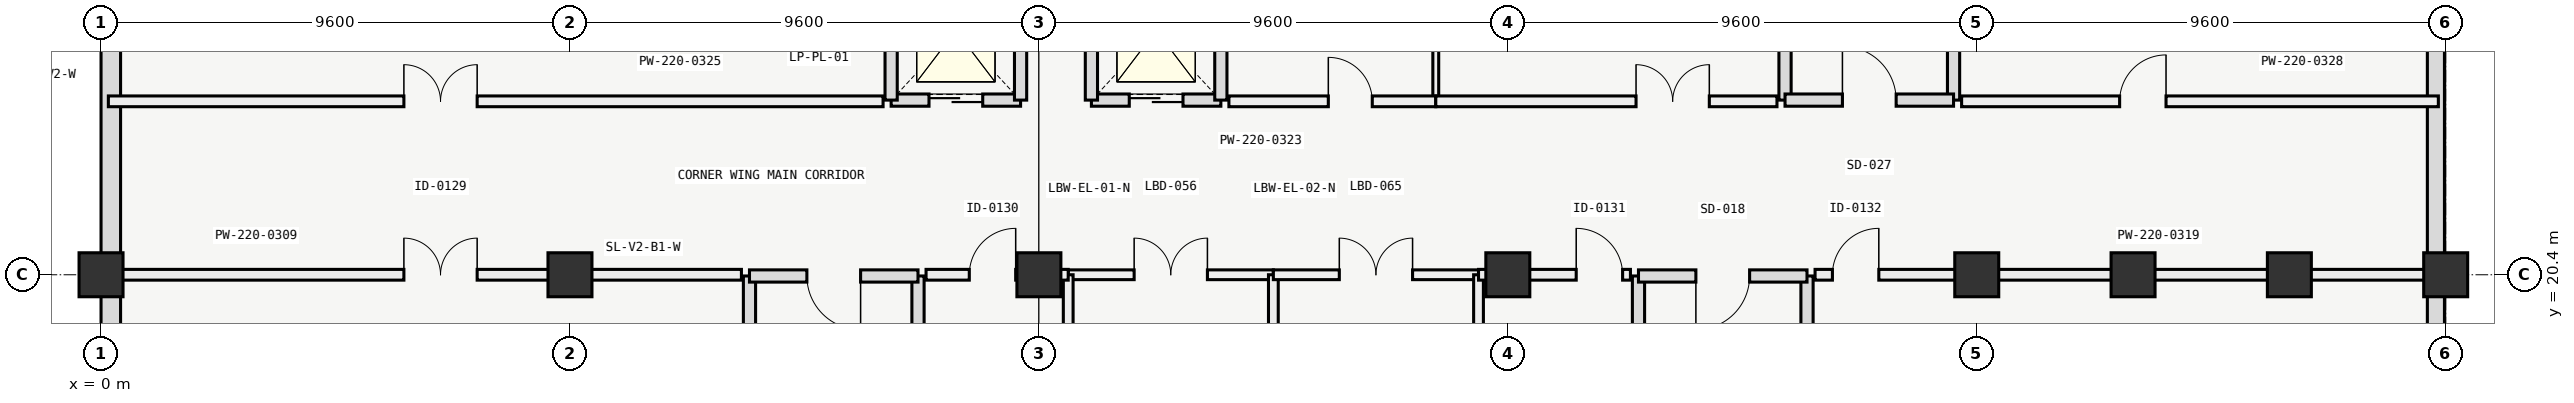
"""IFC4 building model, lengths in metres.
Left out: names, types, materials, properties, quantities, classifications, styles, units other than length and angle.
Written with IfcOpenShell. Run it as: python <this file> out.ifc"""

import sys

from ifc_helpers import new_model, si_unit, direction, frame, frame_2d, origin, origin_2d, place, context, subcontext, project, spatial, rectangle, extrude, element, fill, save


model = new_model("IFC4")
c1 = context("Model", 3, precision=1e-05, world=origin(), true_north=direction((0.0, 1.0)))
c2 = subcontext(c1, "Body", "Model", "MODEL_VIEW")
j1 = project(units=[si_unit("LENGTHUNIT", "METRE"), si_unit("PLANEANGLEUNIT", "RADIAN")], contexts=[c1])
p1 = place(None, origin())
s1 = spatial("IfcSite", under=j1, at=p1, CompositionType="ELEMENT")
p2 = place(p1, origin())
s2 = spatial("IfcBuilding", under=s1, at=p2, CompositionType="ELEMENT")
p3 = place(p2, frame((0.0, 0.0, -4.2)))
s3 = spatial("IfcBuildingStorey", under=s2, at=p3, CompositionType="ELEMENT", Elevation=-4.2)
for number, where, z_axis, x_axis in (
    (1, (0.0, 20.4, 0.0), (0.0, 0.0, 1.0), (1.0, 0.0, 0.0)),
    (2, (9.6, 20.4, 0.0), (0.0, 0.0, 1.0), (1.0, 0.0, 0.0)),
    (3, (19.2, 20.4, 0.0), (0.0, 0.0, 1.0), (1.0, 0.0, 0.0)),
    (4, (28.8, 20.4, 0.0), (0.0, 0.0, 1.0), (1.0, 0.0, 0.0)),
    (5, (38.4, 20.4, 0.0), (0.0, 0.0, 1.0), (1.0, 0.0, 0.0)),
    (6, (41.6, 20.4, 0.0), (0.0, 0.0, 1.0), (1.0, 0.0, 0.0)),
    (7, (44.8, 20.4, 0.0), (0.0, 0.0, 1.0), (1.0, 0.0, 0.0)),
    (8, (48.0, 20.4, 0.0), (0.0, 0.0, 1.0), (1.0, 0.0, 0.0)),
):
    element("IfcColumn", number, at=place(p3, frame(where, z_axis=z_axis, x_axis=x_axis)), inside=s3, PredefinedType="COLUMN", context=c2, shape_type="SweptSolid", body=[
        extrude(rectangle(XDim=0.9, YDim=0.9, at=origin_2d()), origin(), (0.0, 0.0, 1.0), 4.2),
    ])
p4 = place(p3, frame((0.2, 8.4, 0.0), z_axis=(0.0, 0.0, 1.0), x_axis=(0.0, 1.0, 0.0)))
e9 = element("IfcWall", 9, at=p4, inside=s3, PredefinedType="USERDEFINED", context=c2, shape_type="SweptSolid", body=[
    extrude(rectangle(XDim=32.2, YDim=0.4, at=frame_2d((16.1, 0.0))), origin(), (0.0, 0.0, 1.0), 3.9),
])
p5 = place(p3, frame((47.8, 0.2, 0.0), z_axis=(0.0, 0.0, 1.0), x_axis=(0.0, 1.0, 0.0)))
e10 = element("IfcWall", 10, at=p5, inside=s3, PredefinedType="USERDEFINED", context=c2, shape_type="SweptSolid", body=[
    extrude(rectangle(XDim=40.4, YDim=0.35, at=frame_2d((20.2, 0.0))), origin(), (0.0, 0.0, 1.0), 3.9),
])
for number, where, z_axis, x_axis in (
    (11, (13.275, 20.375, 0.0), (0.0, 0.0, 1.0), (0.0, -1.0, 0.0)),
    (12, (16.725, 13.075, 0.0), (0.0, 0.0, 1.0), (0.0, 1.0, 0.0)),
):
    element("IfcWall", number, at=place(p3, frame(where, z_axis=z_axis, x_axis=x_axis)), inside=s3, PredefinedType="SOLIDWALL", context=c2, shape_type="SweptSolid", body=[
        extrude(rectangle(XDim=7.3, YDim=0.25, at=frame_2d((3.65, 0.0))), origin(), (0.0, 0.0, 1.0), 3.9),
    ])
p6 = place(p3, frame((16.725, 20.375, 0.0), z_axis=(0.0, 0.0, 1.0), x_axis=(-1.0, 0.0, 0.0)))
e13 = element("IfcWall", 13, at=p6, inside=s3, PredefinedType="SOLIDWALL", context=c2, shape_type="SweptSolid", body=[
    extrude(rectangle(XDim=3.45, YDim=0.25, at=frame_2d((1.725, 0.0))), origin(), (0.0, 0.0, 1.0), 3.9),
])
p7 = place(p6, frame((1.175, 0.0, 0.0)))
e14 = element("IfcOpeningElement", 14, at=p7, cuts=e13, PredefinedType="OPENING", context=c2, shape_type="SweptSolid", body=[
    extrude(rectangle(XDim=1.1, YDim=2.2, at=frame_2d((0.55, 1.1))), frame((0.0, 0.135, 0.0), z_axis=(0.0, -1.0, 0.0), x_axis=(1.0, 0.0, 0.0)), (0.0, 0.0, 1.0), 0.27),
])
for number, where, z_axis, x_axis in (
    (15, (31.475, 20.375, 0.0), (0.0, 0.0, 1.0), (0.0, -1.0, 0.0)),
    (16, (34.925, 13.075, 0.0), (0.0, 0.0, 1.0), (0.0, 1.0, 0.0)),
):
    element("IfcWall", number, at=place(p3, frame(where, z_axis=z_axis, x_axis=x_axis)), inside=s3, PredefinedType="SOLIDWALL", context=c2, shape_type="SweptSolid", body=[
        extrude(rectangle(XDim=7.3, YDim=0.25, at=frame_2d((3.65, 0.0))), origin(), (0.0, 0.0, 1.0), 3.9),
    ])
p8 = place(p3, frame((34.925, 20.375, 0.0), z_axis=(0.0, 0.0, 1.0), x_axis=(-1.0, 0.0, 0.0)))
e17 = element("IfcWall", 17, at=p8, inside=s3, PredefinedType="SOLIDWALL", context=c2, shape_type="SweptSolid", body=[
    extrude(rectangle(XDim=3.45, YDim=0.25, at=frame_2d((1.725, 0.0))), origin(), (0.0, 0.0, 1.0), 3.9),
])
p9 = place(p8, frame((1.175, 0.0, 0.0)))
e18 = element("IfcOpeningElement", 18, at=p9, cuts=e17, PredefinedType="OPENING", context=c2, shape_type="SweptSolid", body=[
    extrude(rectangle(XDim=1.1, YDim=2.2, at=frame_2d((0.55, 1.1))), frame((0.0, 0.135, 0.0), z_axis=(0.0, -1.0, 0.0), x_axis=(1.0, 0.0, 0.0)), (0.0, 0.0, 1.0), 0.27),
])
for number, where, z_axis, x_axis in (
    (19, (37.925, 23.975, 0.0), (0.0, 0.0, 1.0), (0.0, 1.0, 0.0)),
    (20, (34.475, 31.275, 0.0), (0.0, 0.0, 1.0), (0.0, -1.0, 0.0)),
):
    element("IfcWall", number, at=place(p3, frame(where, z_axis=z_axis, x_axis=x_axis)), inside=s3, PredefinedType="SOLIDWALL", context=c2, shape_type="SweptSolid", body=[
        extrude(rectangle(XDim=7.3, YDim=0.25, at=frame_2d((3.65, 0.0))), origin(), (0.0, 0.0, 1.0), 3.9),
    ])
p10 = place(p3, frame((34.475, 23.975, 0.0), z_axis=(0.0, 0.0, 1.0), x_axis=(1.0, 0.0, 0.0)))
e21 = element("IfcWall", 21, at=p10, inside=s3, PredefinedType="SOLIDWALL", context=c2, shape_type="SweptSolid", body=[
    extrude(rectangle(XDim=3.45, YDim=0.25, at=frame_2d((1.725, 0.0))), origin(), (0.0, 0.0, 1.0), 3.9),
])
p11 = place(p10, frame((1.175, 0.0, 0.0)))
e22 = element("IfcOpeningElement", 22, at=p11, cuts=e21, PredefinedType="OPENING", context=c2, shape_type="SweptSolid", body=[
    extrude(rectangle(XDim=1.1, YDim=2.2, at=frame_2d((0.55, 1.1))), frame((0.0, 0.135, 0.0), z_axis=(0.0, -1.0, 0.0), x_axis=(1.0, 0.0, 0.0)), (0.0, 0.0, 1.0), 0.27),
])
p12 = place(p3, frame((19.8, 20.4, 0.0), z_axis=(0.0, 0.0, 1.0), x_axis=(1.0, 0.0, 0.0)))
e23 = element("IfcWall", 23, at=p12, inside=s3, PredefinedType="PARTITIONING", context=c2, shape_type="SweptSolid", body=[
    extrude(rectangle(XDim=4.2, YDim=0.2, at=frame_2d((2.1, 0.0))), origin(), (0.0, 0.0, 1.0), 3.18),
])
p13 = place(p12, frame((1.35, 0.0, 0.0)))
e24 = element("IfcOpeningElement", 24, at=p13, cuts=e23, PredefinedType="OPENING", context=c2, shape_type="SweptSolid", body=[
    extrude(rectangle(XDim=1.5, YDim=2.2, at=frame_2d((0.75, 1.1))), frame((0.0, 0.11, 0.0), z_axis=(0.0, -1.0, 0.0), x_axis=(1.0, 0.0, 0.0)), (0.0, 0.0, 1.0), 0.22),
])
for number, where, z_axis, x_axis in (
    (25, (19.8, 16.175, 0.0), (0.0, 0.0, 1.0), (0.0, 1.0, 0.0)),
    (26, (24.0, 16.175, 0.0), (0.0, 0.0, 1.0), (0.0, 1.0, 0.0)),
):
    element("IfcWall", number, at=place(p3, frame(where, z_axis=z_axis, x_axis=x_axis)), inside=s3, PredefinedType="PARTITIONING", context=c2, shape_type="SweptSolid", body=[
        extrude(rectangle(XDim=4.225, YDim=0.2, at=frame_2d((2.112, 0.0))), origin(), (0.0, 0.0, 1.0), 3.18),
    ])
p14 = place(p3, frame((24.0, 20.4, 0.0), z_axis=(0.0, 0.0, 1.0), x_axis=(1.0, 0.0, 0.0)))
e27 = element("IfcWall", 27, at=p14, inside=s3, PredefinedType="PARTITIONING", context=c2, shape_type="SweptSolid", body=[
    extrude(rectangle(XDim=4.2, YDim=0.2, at=frame_2d((2.1, 0.0))), origin(), (0.0, 0.0, 1.0), 3.18),
])
p15 = place(p14, frame((1.35, 0.0, 0.0)))
e28 = element("IfcOpeningElement", 28, at=p15, cuts=e27, PredefinedType="OPENING", context=c2, shape_type="SweptSolid", body=[
    extrude(rectangle(XDim=1.5, YDim=2.2, at=frame_2d((0.75, 1.1))), frame((0.0, 0.11, 0.0), z_axis=(0.0, -1.0, 0.0), x_axis=(1.0, 0.0, 0.0)), (0.0, 0.0, 1.0), 0.22),
])
p16 = place(p3, frame((28.2, 16.175, 0.0), z_axis=(0.0, 0.0, 1.0), x_axis=(0.0, 1.0, 0.0)))
e29 = element("IfcWall", 29, at=p16, inside=s3, PredefinedType="PARTITIONING", context=c2, shape_type="SweptSolid", body=[
    extrude(rectangle(XDim=4.225, YDim=0.2, at=frame_2d((2.112, 0.0))), origin(), (0.0, 0.0, 1.0), 3.18),
])
p17 = place(p3, frame((16.175, 23.975, -0.15), z_axis=(0.0, 0.0, 1.0), x_axis=(1.0, 0.0, 0.0)))
e30 = element("IfcWall", 30, at=p17, inside=s3, PredefinedType="SOLIDWALL", context=c2, shape_type="SweptSolid", body=[
    extrude(rectangle(XDim=2.65, YDim=0.25, at=frame_2d((1.325, 0.0))), origin(), (0.0, 0.0, 1.0), 4.05),
])
p18 = place(p17, frame((0.775, 0.0, 0.15)))
e31 = element("IfcOpeningElement", 31, at=p18, cuts=e30, PredefinedType="OPENING", context=c2, shape_type="SweptSolid", body=[
    extrude(rectangle(XDim=1.1, YDim=2.1, at=frame_2d((0.55, 1.05))), frame((0.0, 0.135, 0.0), z_axis=(0.0, -1.0, 0.0), x_axis=(1.0, 0.0, 0.0)), (0.0, 0.0, 1.0), 0.27),
])
for number, where, z_axis, x_axis in (
    (32, (18.825, 23.975, -0.15), (0.0, 0.0, 1.0), (0.0, 1.0, 0.0)),
    (33, (16.175, 26.825, -0.15), (0.0, 0.0, 1.0), (0.0, -1.0, 0.0)),
):
    element("IfcWall", number, at=place(p3, frame(where, z_axis=z_axis, x_axis=x_axis)), inside=s3, PredefinedType="SOLIDWALL", context=c2, shape_type="SweptSolid", body=[
        extrude(rectangle(XDim=2.85, YDim=0.25, at=frame_2d((1.425, 0.0))), origin(), (0.0, 0.0, 1.0), 4.05),
    ])
p19 = place(p3, frame((20.275, 23.975, -0.15), z_axis=(0.0, 0.0, 1.0), x_axis=(1.0, 0.0, 0.0)))
e34 = element("IfcWall", 34, at=p19, inside=s3, PredefinedType="SOLIDWALL", context=c2, shape_type="SweptSolid", body=[
    extrude(rectangle(XDim=2.65, YDim=0.25, at=frame_2d((1.325, 0.0))), origin(), (0.0, 0.0, 1.0), 4.05),
])
p20 = place(p19, frame((0.775, 0.0, 0.15)))
e35 = element("IfcOpeningElement", 35, at=p20, cuts=e34, PredefinedType="OPENING", context=c2, shape_type="SweptSolid", body=[
    extrude(rectangle(XDim=1.1, YDim=2.1, at=frame_2d((0.55, 1.05))), frame((0.0, 0.135, 0.0), z_axis=(0.0, -1.0, 0.0), x_axis=(1.0, 0.0, 0.0)), (0.0, 0.0, 1.0), 0.27),
])
for number, where, z_axis, x_axis in (
    (36, (22.925, 23.975, -0.15), (0.0, 0.0, 1.0), (0.0, 1.0, 0.0)),
    (37, (20.275, 26.825, -0.15), (0.0, 0.0, 1.0), (0.0, -1.0, 0.0)),
):
    element("IfcWall", number, at=place(p3, frame(where, z_axis=z_axis, x_axis=x_axis)), inside=s3, PredefinedType="SOLIDWALL", context=c2, shape_type="SweptSolid", body=[
        extrude(rectangle(XDim=2.85, YDim=0.25, at=frame_2d((1.425, 0.0))), origin(), (0.0, 0.0, 1.0), 4.05),
    ])
p21 = place(p3, frame((0.15, 20.4, 0.0), z_axis=(0.0, 0.0, 1.0), x_axis=(1.0, 0.0, 0.0)))
e38 = element("IfcWall", 38, at=p21, inside=s3, PredefinedType="PARTITIONING", context=c2, shape_type="SweptSolid", body=[
    extrude(rectangle(XDim=12.96, YDim=0.22, at=frame_2d((6.48, 0.0))), origin(), (0.0, 0.0, 1.0), 3.18),
])
p22 = place(p21, frame((6.05, 0.0, 0.0)))
e39 = element("IfcOpeningElement", 39, at=p22, cuts=e38, PredefinedType="OPENING", context=c2, shape_type="SweptSolid", body=[
    extrude(rectangle(XDim=1.5, YDim=2.2, at=frame_2d((0.75, 1.1))), frame((0.0, 0.12, 0.0), z_axis=(0.0, -1.0, 0.0), x_axis=(1.0, 0.0, 0.0)), (0.0, 0.0, 1.0), 0.24),
])
p23 = place(p3, frame((16.89, 20.4, 0.0), z_axis=(0.0, 0.0, 1.0), x_axis=(1.0, 0.0, 0.0)))
e40 = element("IfcWall", 40, at=p23, inside=s3, PredefinedType="PARTITIONING", context=c2, shape_type="SweptSolid", body=[
    extrude(rectangle(XDim=2.91, YDim=0.22, at=frame_2d((1.455, 0.0))), origin(), (0.0, 0.0, 1.0), 3.18),
])
p24 = place(p23, frame((0.885, 0.0, 0.0)))
e41 = element("IfcOpeningElement", 41, at=p24, cuts=e40, PredefinedType="OPENING", context=c2, shape_type="SweptSolid", body=[
    extrude(rectangle(XDim=0.95, YDim=2.1, at=frame_2d((0.475, 1.05))), frame((0.0, 0.12, 0.0), z_axis=(0.0, -1.0, 0.0), x_axis=(1.0, 0.0, 0.0)), (0.0, 0.0, 1.0), 0.24),
])
p25 = place(p3, frame((28.2, 20.4, 0.0), z_axis=(0.0, 0.0, 1.0), x_axis=(1.0, 0.0, 0.0)))
e42 = element("IfcWall", 42, at=p25, inside=s3, PredefinedType="PARTITIONING", context=c2, shape_type="SweptSolid", body=[
    extrude(rectangle(XDim=3.11, YDim=0.22, at=frame_2d((1.555, 0.0))), origin(), (0.0, 0.0, 1.0), 3.18),
])
p26 = place(p25, frame((2.0, 0.0, 0.0)))
e43 = element("IfcOpeningElement", 43, at=p26, cuts=e42, PredefinedType="OPENING", context=c2, shape_type="SweptSolid", body=[
    extrude(rectangle(XDim=0.95, YDim=2.1, at=frame_2d((0.475, 1.05))), frame((0.0, 0.12, 0.0), z_axis=(0.0, -1.0, 0.0), x_axis=(1.0, 0.0, 0.0)), (0.0, 0.0, 1.0), 0.24),
])
p27 = place(p3, frame((35.09, 20.4, 0.0), z_axis=(0.0, 0.0, 1.0), x_axis=(1.0, 0.0, 0.0)))
e44 = element("IfcWall", 44, at=p27, inside=s3, PredefinedType="PARTITIONING", context=c2, shape_type="SweptSolid", body=[
    extrude(rectangle(XDim=12.76, YDim=0.22, at=frame_2d((6.38, 0.0))), origin(), (0.0, 0.0, 1.0), 3.18),
])
p28 = place(p27, frame((0.355, 0.0, 0.0)))
e45 = element("IfcOpeningElement", 45, at=p28, cuts=e44, PredefinedType="OPENING", context=c2, shape_type="SweptSolid", body=[
    extrude(rectangle(XDim=0.95, YDim=2.1, at=frame_2d((0.475, 1.05))), frame((0.0, 0.12, 0.0), z_axis=(0.0, -1.0, 0.0), x_axis=(1.0, 0.0, 0.0)), (0.0, 0.0, 1.0), 0.24),
])
p29 = place(p3, frame((27.325, 23.95, 0.0), z_axis=(0.0, 0.0, 1.0), x_axis=(0.0, 1.0, 0.0)))
e46 = element("IfcWall", 46, at=p29, inside=s3, PredefinedType="PARTITIONING", context=c2, shape_type="SweptSolid", body=[
    extrude(rectangle(XDim=4.2, YDim=0.12, at=frame_2d((2.1, 0.0))), origin(), (0.0, 0.0, 1.0), 3.85),
])
p30 = place(p3, frame((23.09, 23.95, 0.0), z_axis=(0.0, 0.0, 1.0), x_axis=(1.0, 0.0, 0.0)))
e47 = element("IfcWall", 47, at=p30, inside=s3, PredefinedType="PARTITIONING", context=c2, shape_type="SweptSolid", body=[
    extrude(rectangle(XDim=4.235, YDim=0.22, at=frame_2d((2.117, 0.0))), origin(), (0.0, 0.0, 1.0), 3.85),
])
p31 = place(p30, frame((2.035, 0.0, 0.0)))
e48 = element("IfcOpeningElement", 48, at=p31, cuts=e47, PredefinedType="OPENING", context=c2, shape_type="SweptSolid", body=[
    extrude(rectangle(XDim=0.9, YDim=2.05, at=frame_2d((0.45, 1.025))), frame((0.0, 0.12, 0.0), z_axis=(0.0, -1.0, 0.0), x_axis=(1.0, 0.0, 0.0)), (0.0, 0.0, 1.0), 0.24),
])
p32 = place(p3, frame((0.15, 23.95, 0.0), z_axis=(0.0, 0.0, 1.0), x_axis=(1.0, 0.0, 0.0)))
e49 = element("IfcWall", 49, at=p32, inside=s3, PredefinedType="PARTITIONING", context=c2, shape_type="SweptSolid", body=[
    extrude(rectangle(XDim=15.86, YDim=0.22, at=frame_2d((7.93, 0.0))), origin(), (0.0, 0.0, 1.0), 3.23),
])
p33 = place(p32, frame((6.05, 0.0, 0.0)))
e50 = element("IfcOpeningElement", 50, at=p33, cuts=e49, PredefinedType="OPENING", context=c2, shape_type="SweptSolid", body=[
    extrude(rectangle(XDim=1.5, YDim=2.2, at=frame_2d((0.75, 1.1))), frame((0.0, 0.12, 0.0), z_axis=(0.0, -1.0, 0.0), x_axis=(1.0, 0.0, 0.0)), (0.0, 0.0, 1.0), 0.24),
])
p34 = place(p3, frame((27.325, 23.95, 0.0), z_axis=(0.0, 0.0, 1.0), x_axis=(1.0, 0.0, 0.0)))
e51 = element("IfcWall", 51, at=p34, inside=s3, PredefinedType="PARTITIONING", context=c2, shape_type="SweptSolid", body=[
    extrude(rectangle(XDim=6.985, YDim=0.22, at=frame_2d((3.493, 0.0))), origin(), (0.0, 0.0, 1.0), 3.23),
])
p35 = place(p34, frame((4.1, 0.0, 0.0)))
e52 = element("IfcOpeningElement", 52, at=p35, cuts=e51, PredefinedType="OPENING", context=c2, shape_type="SweptSolid", body=[
    extrude(rectangle(XDim=1.5, YDim=2.2, at=frame_2d((0.75, 1.1))), frame((0.0, 0.12, 0.0), z_axis=(0.0, -1.0, 0.0), x_axis=(1.0, 0.0, 0.0)), (0.0, 0.0, 1.0), 0.24),
])
p36 = place(p3, frame((38.09, 23.95, 0.0), z_axis=(0.0, 0.0, 1.0), x_axis=(1.0, 0.0, 0.0)))
e53 = element("IfcWall", 53, at=p36, inside=s3, PredefinedType="PARTITIONING", context=c2, shape_type="SweptSolid", body=[
    extrude(rectangle(XDim=9.76, YDim=0.22, at=frame_2d((4.88, 0.0))), origin(), (0.0, 0.0, 1.0), 3.23),
])
p37 = place(p36, frame((3.235, 0.0, 0.0)))
e54 = element("IfcOpeningElement", 54, at=p37, cuts=e53, PredefinedType="OPENING", context=c2, shape_type="SweptSolid", body=[
    extrude(rectangle(XDim=0.95, YDim=2.1, at=frame_2d((0.475, 1.05))), frame((0.0, 0.12, 0.0), z_axis=(0.0, -1.0, 0.0), x_axis=(1.0, 0.0, 0.0)), (0.0, 0.0, 1.0), 0.24),
])
p38 = place(p7, origin())
e55 = element("IfcDoor", 55, at=p38, inside=s3, OperationType="SINGLE_SWING_LEFT", PredefinedType="DOOR", context=c2, shape_type="SweptSolid", body=[
    extrude(rectangle(XDim=1.1, YDim=2.2, at=frame_2d((0.55, 1.1))), frame((0.0, 0.025, 0.0), z_axis=(0.0, -1.0, 0.0), x_axis=(1.0, 0.0, 0.0)), (0.0, 0.0, 1.0), 0.05),
])
fill(e14, e55)
p39 = place(p9, origin())
e56 = element("IfcDoor", 56, at=p39, inside=s3, OperationType="SINGLE_SWING_RIGHT", PredefinedType="DOOR", context=c2, shape_type="SweptSolid", body=[
    extrude(rectangle(XDim=1.1, YDim=2.2, at=frame_2d((0.55, 1.1))), frame((0.0, 0.025, 0.0), z_axis=(0.0, -1.0, 0.0), x_axis=(1.0, 0.0, 0.0)), (0.0, 0.0, 1.0), 0.05),
])
fill(e18, e56)
p40 = place(p11, origin())
e57 = element("IfcDoor", 57, at=p40, inside=s3, OperationType="SINGLE_SWING_LEFT", PredefinedType="DOOR", context=c2, shape_type="SweptSolid", body=[
    extrude(rectangle(XDim=1.1, YDim=2.2, at=frame_2d((0.55, 1.1))), frame((0.0, 0.025, 0.0), z_axis=(0.0, -1.0, 0.0), x_axis=(1.0, 0.0, 0.0)), (0.0, 0.0, 1.0), 0.05),
])
fill(e22, e57)
p41 = place(p13, origin())
e58 = element("IfcDoor", 58, at=p41, inside=s3, OperationType="SINGLE_SWING_LEFT", PredefinedType="DOOR", context=c2, shape_type="SweptSolid", body=[
    extrude(rectangle(XDim=1.5, YDim=2.2, at=frame_2d((0.75, 1.1))), frame((0.0, 0.025, 0.0), z_axis=(0.0, -1.0, 0.0), x_axis=(1.0, 0.0, 0.0)), (0.0, 0.0, 1.0), 0.05),
])
fill(e24, e58)
p42 = place(p15, origin())
e59 = element("IfcDoor", 59, at=p42, inside=s3, OperationType="SINGLE_SWING_LEFT", PredefinedType="DOOR", context=c2, shape_type="SweptSolid", body=[
    extrude(rectangle(XDim=1.5, YDim=2.2, at=frame_2d((0.75, 1.1))), frame((0.0, 0.025, 0.0), z_axis=(0.0, -1.0, 0.0), x_axis=(1.0, 0.0, 0.0)), (0.0, 0.0, 1.0), 0.05),
])
fill(e28, e59)
p43 = place(p18, origin())
e60 = element("IfcDoor", 60, at=p43, inside=s3, OperationType="SLIDING_TO_LEFT", PredefinedType="DOOR", context=c2, shape_type="SweptSolid", body=[
    extrude(rectangle(XDim=1.1, YDim=2.1, at=frame_2d((0.55, 1.05))), frame((0.0, 0.025, 0.0), z_axis=(0.0, -1.0, 0.0), x_axis=(1.0, 0.0, 0.0)), (0.0, 0.0, 1.0), 0.05),
])
fill(e31, e60)
p44 = place(p20, origin())
e61 = element("IfcDoor", 61, at=p44, inside=s3, OperationType="SLIDING_TO_LEFT", PredefinedType="DOOR", context=c2, shape_type="SweptSolid", body=[
    extrude(rectangle(XDim=1.1, YDim=2.1, at=frame_2d((0.55, 1.05))), frame((0.0, 0.025, 0.0), z_axis=(0.0, -1.0, 0.0), x_axis=(1.0, 0.0, 0.0)), (0.0, 0.0, 1.0), 0.05),
])
fill(e35, e61)
p45 = place(p22, origin())
e62 = element("IfcDoor", 62, at=p45, inside=s3, OperationType="DOUBLE_DOOR_SINGLE_SWING", PredefinedType="DOOR", context=c2, shape_type="SweptSolid", body=[
    extrude(rectangle(XDim=1.5, YDim=2.2, at=frame_2d((0.75, 1.1))), frame((0.0, 0.025, 0.0), z_axis=(0.0, -1.0, 0.0), x_axis=(1.0, 0.0, 0.0)), (0.0, 0.0, 1.0), 0.05),
])
fill(e39, e62)
p46 = place(p24, origin())
e63 = element("IfcDoor", 63, at=p46, inside=s3, OperationType="SINGLE_SWING_RIGHT", PredefinedType="DOOR", context=c2, shape_type="SweptSolid", body=[
    extrude(rectangle(XDim=0.95, YDim=2.1, at=frame_2d((0.475, 1.05))), frame((0.0, 0.025, 0.0), z_axis=(0.0, -1.0, 0.0), x_axis=(1.0, 0.0, 0.0)), (0.0, 0.0, 1.0), 0.05),
])
fill(e41, e63)
p47 = place(p26, origin())
e64 = element("IfcDoor", 64, at=p47, inside=s3, OperationType="SINGLE_SWING_LEFT", PredefinedType="DOOR", context=c2, shape_type="SweptSolid", body=[
    extrude(rectangle(XDim=0.95, YDim=2.1, at=frame_2d((0.475, 1.05))), frame((0.0, 0.025, 0.0), z_axis=(0.0, -1.0, 0.0), x_axis=(1.0, 0.0, 0.0)), (0.0, 0.0, 1.0), 0.05),
])
fill(e43, e64)
p48 = place(p28, origin())
e65 = element("IfcDoor", 65, at=p48, inside=s3, OperationType="SINGLE_SWING_RIGHT", PredefinedType="DOOR", context=c2, shape_type="SweptSolid", body=[
    extrude(rectangle(XDim=0.95, YDim=2.1, at=frame_2d((0.475, 1.05))), frame((0.0, 0.025, 0.0), z_axis=(0.0, -1.0, 0.0), x_axis=(1.0, 0.0, 0.0)), (0.0, 0.0, 1.0), 0.05),
])
fill(e45, e65)
p49 = place(p31, origin())
e66 = element("IfcDoor", 66, at=p49, inside=s3, OperationType="SINGLE_SWING_LEFT", PredefinedType="DOOR", context=c2, shape_type="SweptSolid", body=[
    extrude(rectangle(XDim=0.9, YDim=2.05, at=frame_2d((0.45, 1.025))), frame((0.0, 0.025, 0.0), z_axis=(0.0, -1.0, 0.0), x_axis=(1.0, 0.0, 0.0)), (0.0, 0.0, 1.0), 0.05),
])
fill(e48, e66)
p50 = place(p33, origin())
e67 = element("IfcDoor", 67, at=p50, inside=s3, OperationType="DOUBLE_DOOR_SINGLE_SWING", PredefinedType="DOOR", context=c2, shape_type="SweptSolid", body=[
    extrude(rectangle(XDim=1.5, YDim=2.2, at=frame_2d((0.75, 1.1))), frame((0.0, 0.025, 0.0), z_axis=(0.0, -1.0, 0.0), x_axis=(1.0, 0.0, 0.0)), (0.0, 0.0, 1.0), 0.05),
])
fill(e50, e67)
p51 = place(p35, origin())
e68 = element("IfcDoor", 68, at=p51, inside=s3, OperationType="DOUBLE_DOOR_SINGLE_SWING", PredefinedType="DOOR", context=c2, shape_type="SweptSolid", body=[
    extrude(rectangle(XDim=1.5, YDim=2.2, at=frame_2d((0.75, 1.1))), frame((0.0, 0.025, 0.0), z_axis=(0.0, -1.0, 0.0), x_axis=(1.0, 0.0, 0.0)), (0.0, 0.0, 1.0), 0.05),
])
fill(e52, e68)
p52 = place(p37, origin())
e69 = element("IfcDoor", 69, at=p52, inside=s3, OperationType="SINGLE_SWING_RIGHT", PredefinedType="DOOR", context=c2, shape_type="SweptSolid", body=[
    extrude(rectangle(XDim=0.95, YDim=2.1, at=frame_2d((0.475, 1.05))), frame((0.0, 0.025, 0.0), z_axis=(0.0, -1.0, 0.0), x_axis=(1.0, 0.0, 0.0)), (0.0, 0.0, 1.0), 0.05),
])
fill(e54, e69)
save(model, sys.argv[1])
